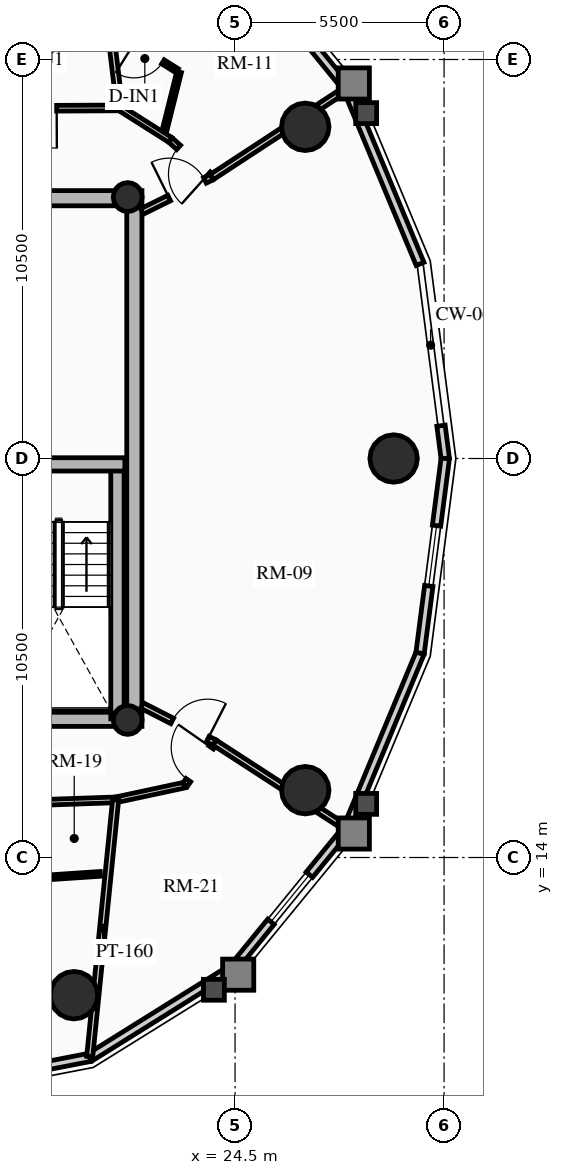
"""IFC4 building model, lengths in metres.
Left out: names, types, materials, properties, quantities, classifications, styles, units other than length and angle.
Written with IfcOpenShell. Run it as: python <this file> out.ifc"""

import sys

from ifc_helpers import new_model, si_unit, direction, frame, frame_2d, origin, origin_2d, place, context, subcontext, project, spatial, rectangle, circle, hollow_circle, extrude, source, transform, mapped, element, fill, save


model = new_model("IFC4")
c1 = context("Model", 3, precision=1e-05, world=origin(), true_north=direction((0.0, 1.0)))
c2 = subcontext(c1, "Body", "Model", "MODEL_VIEW")
j1 = project(units=[si_unit("LENGTHUNIT", "METRE"), si_unit("PLANEANGLEUNIT", "RADIAN")], contexts=[c1])
p1 = place(None, origin())
s1 = spatial("IfcSite", under=j1, at=p1, CompositionType="ELEMENT")
p2 = place(p1, origin())
s2 = spatial("IfcBuilding", under=s1, at=p2, CompositionType="ELEMENT")
p3 = place(p2, frame((0.0, 0.0, 177.79)))
s3 = spatial("IfcBuildingStorey", under=s2, at=p3, CompositionType="ELEMENT", Elevation=177.79)
p4 = place(p3, frame((21.85, 17.45, 0.0), z_axis=(0.0, 0.0, 1.0), x_axis=(0.0, 1.0, 0.0)))
e1 = element("IfcWall", 1, at=p4, inside=s3, PredefinedType="SHEAR", context=c2, shape_type="SweptSolid", body=[
    extrude(rectangle(XDim=14.1, YDim=0.4, at=frame_2d((7.05, 0.0))), origin(), (0.0, 0.0, 1.0), 2.91),
])
p5 = place(p3, frame((11.15, 17.65, 0.0), z_axis=(0.0, 0.0, 1.0), x_axis=(1.0, 0.0, 0.0)))
e2 = element("IfcWall", 2, at=p5, inside=s3, PredefinedType="SHEAR", context=c2, shape_type="SweptSolid", body=[
    extrude(rectangle(XDim=10.7, YDim=0.4, at=frame_2d((5.35, 0.0))), origin(), (0.0, 0.0, 1.0), 2.91),
])
m1 = source(origin(), c2, "Body", "SweptSolid", [
    extrude(rectangle(XDim=1.5, YDim=2.02, at=frame_2d((0.75, 1.01))), frame((0.0, 0.21, 0.0), z_axis=(0.0, -1.0, 0.0), x_axis=(1.0, 0.0, 0.0)), (0.0, 0.0, 1.0), 0.42),
])
p6 = place(p5, frame((5.45, 0.0, 0.0)))
e3 = element("IfcOpeningElement", 3, at=p6, cuts=e2, PredefinedType="OPENING", context=c2, shape_type="MappedRepresentation", body=[
    mapped(m1, transform((0.0, 0.0, 0.0), x_axis=(1.0, 0.0, 0.0), y_axis=(0.0, 1.0, 0.0), z_axis=(0.0, 0.0, 1.0), scale=1.0)),
])
p7 = place(p3, frame((11.15, 31.35, 0.0), z_axis=(0.0, 0.0, 1.0), x_axis=(1.0, 0.0, 0.0)))
e4 = element("IfcWall", 4, at=p7, inside=s3, PredefinedType="SHEAR", context=c2, shape_type="SweptSolid", body=[
    extrude(rectangle(XDim=10.7, YDim=0.4, at=frame_2d((5.35, 0.0))), origin(), (0.0, 0.0, 1.0), 2.91),
])
p8 = place(p7, frame((4.6, 0.0, 0.0)))
e5 = element("IfcOpeningElement", 5, at=p8, cuts=e4, PredefinedType="OPENING", context=c2, shape_type="MappedRepresentation", body=[
    mapped(m1, transform((0.0, 0.0, 0.0), x_axis=(1.0, 0.0, 0.0), y_axis=(0.0, 1.0, 0.0), z_axis=(0.0, 0.0, 1.0), scale=1.0)),
])
p9 = place(p3, frame((21.405, 17.65, 0.0), z_axis=(0.0, 0.0, 1.0), x_axis=(0.0, 1.0, 0.0)))
e6 = element("IfcWall", 6, at=p9, inside=s3, PredefinedType="SHEAR", context=c2, shape_type="SweptSolid", body=[
    extrude(rectangle(XDim=6.695, YDim=0.35, at=frame_2d((3.348, 0.0))), origin(), (0.0, 0.0, 1.0), 2.91),
])
p10 = place(p3, frame((18.315, 24.345, 0.0), z_axis=(0.0, 0.0, 1.0), x_axis=(1.0, 0.0, 0.0)))
e7 = element("IfcWall", 7, at=p10, inside=s3, PredefinedType="SHEAR", context=c2, shape_type="SweptSolid", body=[
    extrude(rectangle(XDim=3.285, YDim=0.35, at=frame_2d((1.643, 0.0))), origin(), (0.0, 0.0, 1.0), 2.91),
])
for number, where, z_axis, x_axis in (
    (8, (21.675, 17.62, 0.0), (0.0, 0.0, 1.0), (1.0, 0.0, 0.0)),
    (9, (21.675, 31.38, 0.0), (0.0, 0.0, 1.0), (1.0, 0.0, 0.0)),
):
    element("IfcColumn", number, at=place(p3, frame(where, z_axis=z_axis, x_axis=x_axis)), inside=s3, PredefinedType="COLUMN", context=c2, shape_type="SweptSolid", body=[
        extrude(hollow_circle(Radius=0.38, WallThickness=0.032, at=origin_2d()), origin(), (0.0, 0.0, 1.0), 2.91),
    ])
for number, where, z_axis, x_axis in (
    (10, (28.672, 24.5, 0.0), (0.0, 0.0, 1.0), (1.0, 0.0, 0.0)),
    (11, (26.347, 33.229, 0.0), (0.0, 0.0, 1.0), (1.0, 0.0, 0.0)),
    (12, (20.261, 10.377, 0.0), (0.0, 0.0, 1.0), (1.0, 0.0, 0.0)),
    (13, (26.347, 15.771, 0.0), (0.0, 0.0, 1.0), (1.0, 0.0, 0.0)),
):
    element("IfcColumn", number, at=place(p3, frame(where, z_axis=z_axis, x_axis=x_axis)), inside=s3, PredefinedType="USERDEFINED", context=c2, shape_type="SweptSolid", body=[
        extrude(circle(Radius=0.625, at=origin_2d()), origin(), (0.0, 0.0, 1.0), 2.91),
    ])
p11 = place(p3, frame((29.919, 25.363, 0.0), z_axis=(0.0, 0.0, 1.0), x_axis=(0.128247365719, -0.991742211054, 0.0)))
e14 = element("IfcWall", 14, at=p11, inside=s3, PredefinedType="SOLIDWALL", context=c2, shape_type="SweptSolid", body=[
    extrude(rectangle(XDim=0.87, YDim=0.22, at=frame_2d((0.435, 0.0))), origin(), (0.0, 0.0, 1.0), 2.675),
])
p12 = place(p3, frame((27.447, 34.24, 0.0), z_axis=(0.0, 0.0, 1.0), x_axis=(0.384144094086, -0.923273152961, 0.0)))
e15 = element("IfcWall", 15, at=p12, inside=s3, PredefinedType="SOLIDWALL", context=c2, shape_type="SweptSolid", body=[
    extrude(rectangle(XDim=5.003, YDim=0.22, at=frame_2d((2.501, 0.0))), origin(), (0.0, 0.0, 1.0), 2.245),
])
p13 = place(p3, frame((24.453, 37.906, 0.0), z_axis=(0.0, 0.0, 1.0), x_axis=(0.632470615287, -0.774584353572, 0.0)))
e16 = element("IfcWall", 16, at=p13, inside=s3, PredefinedType="SOLIDWALL", context=c2, shape_type="SweptSolid", body=[
    extrude(rectangle(XDim=4.733, YDim=0.22, at=frame_2d((2.366, 0.0))), origin(), (0.0, 0.0, 1.0), 2.245),
])
m2 = source(origin(), c2, "Body", "SweptSolid", [
    extrude(rectangle(XDim=1.6, YDim=1.3, at=frame_2d((0.8, 0.65))), frame((0.0, 0.12, 0.0), z_axis=(0.0, -1.0, 0.0), x_axis=(1.0, 0.0, 0.0)), (0.0, 0.0, 1.0), 0.24),
])
p14 = place(p13, frame((1.566, 0.0, 0.65)))
e17 = element("IfcOpeningElement", 17, at=p14, cuts=e16, PredefinedType="OPENING", context=c2, shape_type="MappedRepresentation", body=[
    mapped(m2, transform((0.0, 0.0, 0.0), x_axis=(1.0, 0.0, 0.0), y_axis=(0.0, 1.0, 0.0), z_axis=(0.0, 0.0, 1.0), scale=1.0)),
])
p15 = place(p3, frame((20.681, 8.741, 0.0), z_axis=(0.0, 0.0, 1.0), x_axis=(-0.981703883443, -0.190413983815, 0.0)))
e18 = element("IfcWall", 18, at=p15, inside=s3, PredefinedType="SOLIDWALL", context=c2, shape_type="SweptSolid", body=[
    extrude(rectangle(XDim=4.259, YDim=0.22, at=frame_2d((2.13, 0.0))), origin(), (0.0, 0.0, 1.0), 2.245),
])
p16 = place(p15, frame((1.33, 0.0, 0.65)))
e19 = element("IfcOpeningElement", 19, at=p16, cuts=e18, PredefinedType="OPENING", context=c2, shape_type="MappedRepresentation", body=[
    mapped(m2, transform((0.0, 0.0, 0.0), x_axis=(1.0, 0.0, 0.0), y_axis=(0.0, 1.0, 0.0), z_axis=(0.0, 0.0, 1.0), scale=1.0)),
])
p17 = place(p3, frame((24.453, 11.094, 0.0), z_axis=(0.0, 0.0, 1.0), x_axis=(-0.848399108042, -0.529357113368, 0.0)))
e20 = element("IfcWall", 20, at=p17, inside=s3, PredefinedType="SOLIDWALL", context=c2, shape_type="SweptSolid", body=[
    extrude(rectangle(XDim=4.446, YDim=0.22, at=frame_2d((2.223, 0.0))), origin(), (0.0, 0.0, 1.0), 2.245),
])
p18 = place(p3, frame((27.447, 14.76, 0.0), z_axis=(0.0, 0.0, 1.0), x_axis=(-0.632470615287, -0.774584353572, 0.0)))
e21 = element("IfcWall", 21, at=p18, inside=s3, PredefinedType="SOLIDWALL", context=c2, shape_type="SweptSolid", body=[
    extrude(rectangle(XDim=4.733, YDim=0.22, at=frame_2d((2.366, 0.0))), origin(), (0.0, 0.0, 1.0), 2.245),
])
p19 = place(p18, frame((1.566, 0.0, 0.65)))
e22 = element("IfcOpeningElement", 22, at=p19, cuts=e21, PredefinedType="OPENING", context=c2, shape_type="MappedRepresentation", body=[
    mapped(m2, transform((0.0, 0.0, 0.0), x_axis=(1.0, 0.0, 0.0), y_axis=(0.0, 1.0, 0.0), z_axis=(0.0, 0.0, 1.0), scale=1.0)),
])
p20 = place(p3, frame((29.369, 19.38, 0.0), z_axis=(0.0, 0.0, 1.0), x_axis=(-0.384144094086, -0.923273152961, 0.0)))
e23 = element("IfcWall", 23, at=p20, inside=s3, PredefinedType="SOLIDWALL", context=c2, shape_type="SweptSolid", body=[
    extrude(rectangle(XDim=5.003, YDim=0.22, at=frame_2d((2.501, 0.0))), origin(), (0.0, 0.0, 1.0), 2.245),
])
p21 = place(p3, frame((30.031, 24.5, 0.0), z_axis=(0.0, 0.0, 1.0), x_axis=(-0.128287912609, -0.991736966881, 0.0)))
e24 = element("IfcWall", 24, at=p21, inside=s3, PredefinedType="SOLIDWALL", context=c2, shape_type="SweptSolid", body=[
    extrude(rectangle(XDim=5.163, YDim=0.22, at=frame_2d((2.582, 0.0))), origin(), (0.0, 0.0, 1.0), 2.245),
])
p22 = place(p21, frame((1.782, 0.0, 0.65)))
e25 = element("IfcOpeningElement", 25, at=p22, cuts=e24, PredefinedType="OPENING", context=c2, shape_type="MappedRepresentation", body=[
    mapped(m2, transform((0.0, 0.0, 0.0), x_axis=(1.0, 0.0, 0.0), y_axis=(0.0, 1.0, 0.0), z_axis=(0.0, 0.0, 1.0), scale=1.0)),
])
p23 = place(p3, frame((23.887, 31.906, 0.0), z_axis=(0.0, 0.0, 1.0), x_axis=(-0.744900957214, 0.66717506244, 0.0)))
e26 = element("IfcWall", 26, at=p23, inside=s3, PredefinedType="PARTITIONING", context=c2, shape_type="SweptSolid", body=[
    extrude(rectangle(XDim=1.464, YDim=0.15, at=frame_2d((0.732, 0.0))), origin(), (0.0, 0.0, 1.0), 2.245),
])
m3 = source(origin(), c2, "Body", "SweptSolid", [
    extrude(rectangle(XDim=1.05, YDim=2.015, at=frame_2d((0.525, 1.007))), frame((0.0, 0.085, 0.0), z_axis=(0.0, -1.0, 0.0), x_axis=(1.0, 0.0, 0.0)), (0.0, 0.0, 1.0), 0.17),
])
p24 = place(p23, frame((0.12, 0.0, 0.0)))
e27 = element("IfcOpeningElement", 27, at=p24, cuts=e26, PredefinedType="OPENING", context=c2, shape_type="MappedRepresentation", body=[
    mapped(m3, transform((0.0, 0.0, 0.0), x_axis=(1.0, 0.0, 0.0), y_axis=(0.0, 1.0, 0.0), z_axis=(0.0, 0.0, 1.0), scale=1.0)),
])
p25 = place(p3, frame((22.797, 32.883, 0.0), z_axis=(0.0, 0.0, 1.0), x_axis=(-0.84484009232, 0.535018895375, 0.0)))
e28 = element("IfcWall", 28, at=p25, inside=s3, PredefinedType="PARTITIONING", context=c2, shape_type="SweptSolid", body=[
    extrude(rectangle(XDim=1.575, YDim=0.15, at=frame_2d((0.788, 0.0))), origin(), (0.0, 0.0, 1.0), 2.245),
])
p26 = place(p3, frame((21.466, 33.726, 0.0), z_axis=(0.0, 0.0, 1.0), x_axis=(-0.99998838579, -0.004819573058, 0.0)))
e29 = element("IfcWall", 29, at=p26, inside=s3, PredefinedType="PARTITIONING", context=c2, shape_type="SweptSolid", body=[
    extrude(rectangle(XDim=3.343, YDim=0.15, at=frame_2d((1.672, 0.0))), origin(), (0.0, 0.0, 1.0), 2.245),
])
p27 = place(p26, frame((1.66, 0.0, 0.0)))
e30 = element("IfcOpeningElement", 30, at=p27, cuts=e29, PredefinedType="OPENING", context=c2, shape_type="MappedRepresentation", body=[
    mapped(m3, transform((0.0, 0.0, 0.0), x_axis=(1.0, 0.0, 0.0), y_axis=(0.0, 1.0, 0.0), z_axis=(0.0, 0.0, 1.0), scale=1.0)),
])
p28 = place(p3, frame((14.802, 15.291, 0.0), z_axis=(0.0, 0.0, 1.0), x_axis=(0.999405778293, 0.034468686011, 0.0)))
e31 = element("IfcWall", 31, at=p28, inside=s3, PredefinedType="PARTITIONING", context=c2, shape_type="SweptSolid", body=[
    extrude(rectangle(XDim=6.559, YDim=0.15, at=frame_2d((3.279, 0.0))), origin(), (0.0, 0.0, 1.0), 2.245),
])
p29 = place(p3, frame((21.357, 15.517, 0.0), z_axis=(0.0, 0.0, 1.0), x_axis=(0.977773676035, 0.209663154733, 0.0)))
e32 = element("IfcWall", 32, at=p29, inside=s3, PredefinedType="PARTITIONING", context=c2, shape_type="SweptSolid", body=[
    extrude(rectangle(XDim=1.865, YDim=0.15, at=frame_2d((0.933, 0.0))), origin(), (0.0, 0.0, 1.0), 2.245),
])
p30 = place(p3, frame((23.181, 15.908, 0.0), z_axis=(0.0, 0.0, 1.0), x_axis=(0.571342842249, 0.820711494138, 0.0)))
e33 = element("IfcWall", 33, at=p30, inside=s3, PredefinedType="PARTITIONING", context=c2, shape_type="SweptSolid", body=[
    extrude(rectangle(XDim=1.362, YDim=0.15, at=frame_2d((0.681, 0.0))), origin(), (0.0, 0.0, 1.0), 2.245),
])
p31 = place(p30, frame((0.156, 0.0, 0.0)))
e34 = element("IfcOpeningElement", 34, at=p31, cuts=e33, PredefinedType="OPENING", context=c2, shape_type="MappedRepresentation", body=[
    mapped(m3, transform((0.0, 0.0, 0.0), x_axis=(1.0, 0.0, 0.0), y_axis=(0.0, 1.0, 0.0), z_axis=(0.0, 0.0, 1.0), scale=1.0)),
])
p32 = place(p3, frame((23.887, 31.906, 0.0), z_axis=(0.0, 0.0, 1.0), x_axis=(0.836482991446, 0.547992887748, 0.0)))
e35 = element("IfcWall", 35, at=p32, inside=s3, PredefinedType="PARTITIONING", context=c2, shape_type="SweptSolid", body=[
    extrude(rectangle(XDim=4.236, YDim=0.16, at=frame_2d((2.118, 0.0))), origin(), (0.0, 0.0, 1.0), 2.245),
])
p33 = place(p3, frame((21.466, 33.726, 0.0), z_axis=(0.0, 0.0, 1.0), x_axis=(-0.12050358126, 0.992712892484, 0.0)))
e36 = element("IfcWall", 36, at=p33, inside=s3, PredefinedType="PARTITIONING", context=c2, shape_type="SweptSolid", body=[
    extrude(rectangle(XDim=6.562, YDim=0.16, at=frame_2d((3.281, 0.0))), origin(), (0.0, 0.0, 1.0), 2.245),
])
p34 = place(p3, frame((21.357, 15.517, 0.0), z_axis=(0.0, 0.0, 1.0), x_axis=(-0.100446941693, -0.994942416376, 0.0)))
e37 = element("IfcWall", 37, at=p34, inside=s3, PredefinedType="PARTITIONING", context=c2, shape_type="SweptSolid", body=[
    extrude(rectangle(XDim=6.791, YDim=0.16, at=frame_2d((3.396, 0.0))), origin(), (0.0, 0.0, 1.0), 2.245),
])
p35 = place(p3, frame((23.959, 17.025, 0.0), z_axis=(0.0, 0.0, 1.0), x_axis=(0.838803293388, -0.544434601215, 0.0)))
e38 = element("IfcWall", 38, at=p35, inside=s3, PredefinedType="PARTITIONING", context=c2, shape_type="SweptSolid", body=[
    extrude(rectangle(XDim=4.139, YDim=0.16, at=frame_2d((2.069, 0.0))), origin(), (0.0, 0.0, 1.0), 2.245),
])
p36 = place(p3, frame((22.05, 31.0, 0.0), z_axis=(0.0, 0.0, 1.0), x_axis=(0.896798317999, 0.442439574218, 0.0)))
e39 = element("IfcWall", 39, at=p36, inside=s3, PredefinedType="PARTITIONING", context=c2, shape_type="SweptSolid", body=[
    extrude(rectangle(XDim=2.048, YDim=0.16, at=frame_2d((1.024, 0.0))), origin(), (0.0, 0.0, 1.0), 2.245),
])
m4 = source(origin(), c2, "Body", "SweptSolid", [
    extrude(rectangle(XDim=1.05, YDim=2.015, at=frame_2d((0.525, 1.007))), frame((0.0, 0.09, 0.0), z_axis=(0.0, -1.0, 0.0), x_axis=(1.0, 0.0, 0.0)), (0.0, 0.0, 1.0), 0.18),
])
p37 = place(p36, frame((0.798, 0.0, 0.0)))
e40 = element("IfcOpeningElement", 40, at=p37, cuts=e39, PredefinedType="OPENING", context=c2, shape_type="MappedRepresentation", body=[
    mapped(m4, transform((0.0, 0.0, 0.0), x_axis=(1.0, 0.0, 0.0), y_axis=(0.0, 1.0, 0.0), z_axis=(0.0, 0.0, 1.0), scale=1.0)),
])
p38 = place(p3, frame((22.05, 18.0, 0.0), z_axis=(0.0, 0.0, 1.0), x_axis=(0.890660222535, -0.454669515136, 0.0)))
e41 = element("IfcWall", 41, at=p38, inside=s3, PredefinedType="PARTITIONING", context=c2, shape_type="SweptSolid", body=[
    extrude(rectangle(XDim=2.144, YDim=0.16, at=frame_2d((1.072, 0.0))), origin(), (0.0, 0.0, 1.0), 2.245),
])
p39 = place(p38, frame((0.894, 0.0, 0.0)))
e42 = element("IfcOpeningElement", 42, at=p39, cuts=e41, PredefinedType="OPENING", context=c2, shape_type="MappedRepresentation", body=[
    mapped(m4, transform((0.0, 0.0, 0.0), x_axis=(1.0, 0.0, 0.0), y_axis=(0.0, 1.0, 0.0), z_axis=(0.0, 0.0, 1.0), scale=1.0)),
])
p40 = place(p3, frame((22.649, 33.157, 0.0), z_axis=(0.0, 0.0, 1.0), x_axis=(0.242461964074, 0.970160912415, 0.0)))
e43 = element("IfcWall", 43, at=p40, inside=s3, PredefinedType="PARTITIONING", context=c2, shape_type="SweptSolid", body=[
    extrude(rectangle(XDim=1.56, YDim=0.125, at=frame_2d((0.78, 0.0))), origin(), (0.0, 0.0, 1.0), 2.245),
])
p41 = place(p3, frame((22.975, 34.704, 0.0), z_axis=(0.0, 0.0, 1.0), x_axis=(-0.84683355027, 0.531858005615, 0.0)))
e44 = element("IfcWall", 44, at=p41, inside=s3, PredefinedType="PARTITIONING", context=c2, shape_type="SweptSolid", body=[
    extrude(rectangle(XDim=1.994, YDim=0.125, at=frame_2d((0.997, 0.0))), origin(), (0.0, 0.0, 1.0), 2.675),
])
m5 = source(origin(), c2, "Body", "SweptSolid", [
    extrude(rectangle(XDim=0.9, YDim=2.005, at=frame_2d((0.45, 1.002))), frame((0.0, 0.073, 0.0), z_axis=(0.0, -1.0, 0.0), x_axis=(1.0, 0.0, 0.0)), (0.0, 0.0, 1.0), 0.145),
])
p42 = place(p41, frame((0.44, 0.0, 0.0)))
e45 = element("IfcOpeningElement", 45, at=p42, cuts=e44, PredefinedType="OPENING", context=c2, shape_type="MappedRepresentation", body=[
    mapped(m5, transform((0.0, 0.0, 0.0), x_axis=(1.0, 0.0, 0.0), y_axis=(0.0, 1.0, 0.0), z_axis=(0.0, 0.0, 1.0), scale=1.0)),
])
p43 = place(p3, frame((18.137, 13.38, 0.0), z_axis=(0.0, 0.0, 1.0), x_axis=(0.997767152953, 0.066788535611, 0.0)))
e46 = element("IfcWall", 46, at=p43, inside=s3, PredefinedType="PARTITIONING", context=c2, shape_type="SweptSolid", body=[
    extrude(rectangle(XDim=2.826, YDim=0.125, at=frame_2d((1.413, 0.0))), origin(), (0.0, 0.0, 1.0), 2.245),
])
p44 = place(p43, frame((0.12, 0.0, 0.0)))
e47 = element("IfcOpeningElement", 47, at=p44, cuts=e46, PredefinedType="OPENING", context=c2, shape_type="MappedRepresentation", body=[
    mapped(m5, transform((0.0, 0.0, 0.0), x_axis=(1.0, 0.0, 0.0), y_axis=(0.0, 1.0, 0.0), z_axis=(0.0, 0.0, 1.0), scale=1.0)),
])
m6 = source(origin(), c2, "Body", "SweptSolid", [
    extrude(rectangle(XDim=1.6, YDim=1.3, at=frame_2d((0.8, 0.65))), frame((0.0, 0.03, 0.0), z_axis=(0.0, -1.0, 0.0), x_axis=(1.0, 0.0, 0.0)), (0.0, 0.0, 1.0), 0.06),
])
p45 = place(p19, origin())
e48 = element("IfcWindow", 48, at=p45, inside=s3, PartitioningType="SINGLE_PANEL", PredefinedType="WINDOW", context=c2, shape_type="MappedRepresentation", body=[
    mapped(m6, transform((0.0, 0.0, 0.0), x_axis=(1.0, 0.0, 0.0), y_axis=(0.0, 1.0, 0.0), z_axis=(0.0, 0.0, 1.0), scale=1.0)),
])
fill(e22, e48)
p46 = place(p22, origin())
e49 = element("IfcWindow", 49, at=p46, inside=s3, PartitioningType="SINGLE_PANEL", PredefinedType="WINDOW", context=c2, shape_type="MappedRepresentation", body=[
    mapped(m6, transform((0.0, 0.0, 0.0), x_axis=(1.0, 0.0, 0.0), y_axis=(0.0, 1.0, 0.0), z_axis=(0.0, 0.0, 1.0), scale=1.0)),
])
fill(e25, e49)
m7 = source(origin(), c2, "Body", "SweptSolid", [
    extrude(rectangle(XDim=1.05, YDim=2.015, at=frame_2d((0.525, 1.007))), frame((0.0, 0.025, 0.0), z_axis=(0.0, -1.0, 0.0), x_axis=(1.0, 0.0, 0.0)), (0.0, 0.0, 1.0), 0.05),
])
p47 = place(p37, origin())
e50 = element("IfcDoor", 50, at=p47, inside=s3, OperationType="SINGLE_SWING_LEFT", PredefinedType="DOOR", context=c2, shape_type="MappedRepresentation", body=[
    mapped(m7, transform((0.0, 0.0, 0.0), x_axis=(1.0, 0.0, 0.0), y_axis=(0.0, 1.0, 0.0), z_axis=(0.0, 0.0, 1.0), scale=1.0)),
])
fill(e40, e50)
p48 = place(p39, origin())
e51 = element("IfcDoor", 51, at=p48, inside=s3, OperationType="SINGLE_SWING_RIGHT", PredefinedType="DOOR", context=c2, shape_type="MappedRepresentation", body=[
    mapped(m7, transform((0.0, 0.0, 0.0), x_axis=(1.0, 0.0, 0.0), y_axis=(0.0, 1.0, 0.0), z_axis=(0.0, 0.0, 1.0), scale=1.0)),
])
fill(e42, e51)
p49 = place(p24, origin())
e52 = element("IfcDoor", 52, at=p49, inside=s3, OperationType="SINGLE_SWING_LEFT", PredefinedType="DOOR", context=c2, shape_type="MappedRepresentation", body=[
    mapped(m7, transform((0.0, 0.0, 0.0), x_axis=(1.0, 0.0, 0.0), y_axis=(0.0, 1.0, 0.0), z_axis=(0.0, 0.0, 1.0), scale=1.0)),
])
fill(e27, e52)
m8 = source(origin(), c2, "Body", "SweptSolid", [
    extrude(rectangle(XDim=0.9, YDim=2.005, at=frame_2d((0.45, 1.002))), frame((0.0, 0.025, 0.0), z_axis=(0.0, -1.0, 0.0), x_axis=(1.0, 0.0, 0.0)), (0.0, 0.0, 1.0), 0.05),
])
p50 = place(p42, origin())
e53 = element("IfcDoor", 53, at=p50, inside=s3, OperationType="SINGLE_SWING_RIGHT", PredefinedType="DOOR", context=c2, shape_type="MappedRepresentation", body=[
    mapped(m8, transform((0.0, 0.0, 0.0), x_axis=(1.0, 0.0, 0.0), y_axis=(0.0, 1.0, 0.0), z_axis=(0.0, 0.0, 1.0), scale=1.0)),
])
fill(e45, e53)
p51 = place(p27, origin())
e54 = element("IfcDoor", 54, at=p51, inside=s3, OperationType="SINGLE_SWING_LEFT", PredefinedType="DOOR", context=c2, shape_type="MappedRepresentation", body=[
    mapped(m7, transform((0.0, 0.0, 0.0), x_axis=(1.0, 0.0, 0.0), y_axis=(0.0, 1.0, 0.0), z_axis=(0.0, 0.0, 1.0), scale=1.0)),
])
fill(e30, e54)
p52 = place(p31, origin())
e55 = element("IfcDoor", 55, at=p52, inside=s3, OperationType="SINGLE_SWING_RIGHT", PredefinedType="DOOR", context=c2, shape_type="MappedRepresentation", body=[
    mapped(m7, transform((0.0, 0.0, 0.0), x_axis=(1.0, 0.0, 0.0), y_axis=(0.0, 1.0, 0.0), z_axis=(0.0, 0.0, 1.0), scale=1.0)),
])
fill(e34, e55)
save(model, sys.argv[1])
